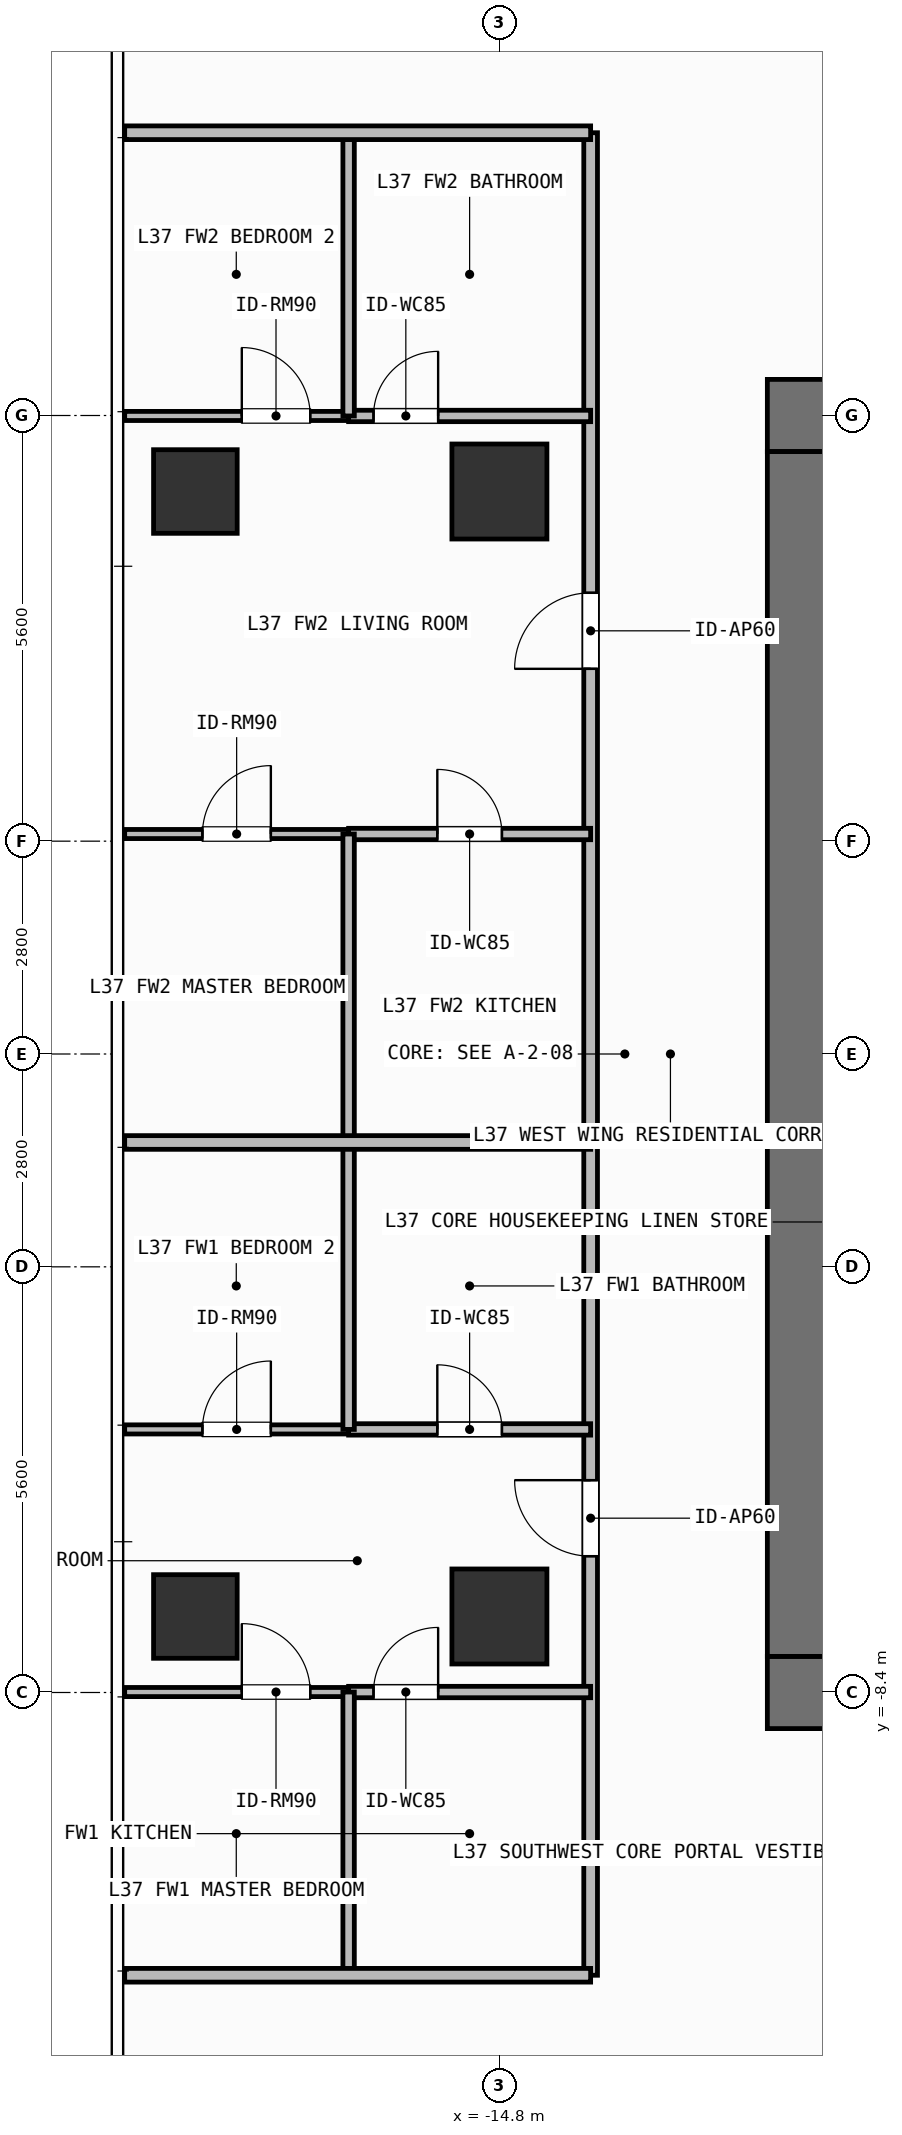
"""IFC4 building model, lengths in metres.
Left out: names, types, materials, properties, quantities, classifications, styles, units other than length and angle.
Written with IfcOpenShell. Run it as: python <this file> out.ifc"""

import sys

from ifc_helpers import new_model, si_unit, direction, frame, frame_2d, origin, origin_2d, place, context, subcontext, project, spatial, rectangle, extrude, element, fill, save


model = new_model("IFC4")
c1 = context("Model", 3, precision=1e-05, world=origin(), true_north=direction((0.0, 1.0)))
c2 = subcontext(c1, "Body", "Model", "MODEL_VIEW")
j1 = project(units=[si_unit("LENGTHUNIT", "METRE"), si_unit("PLANEANGLEUNIT", "RADIAN")], contexts=[c1])
p1 = place(None, origin())
s1 = spatial("IfcSite", under=j1, at=p1, CompositionType="ELEMENT")
p2 = place(p1, origin())
s2 = spatial("IfcBuilding", under=s1, at=p2, CompositionType="ELEMENT")
p3 = place(p2, frame((0.0, 0.0, 148.5)))
s3 = spatial("IfcBuildingStorey", under=s2, at=p3, CompositionType="ELEMENT", Elevation=148.5)
for number, where, z_axis, x_axis in (
    (1, (-11.275, -8.4, 0.0), (0.0, 0.0, 1.0), (1.0, 0.0, 0.0)),
    (2, (-11.275, 8.4, 0.0), (0.0, 0.0, 1.0), (1.0, 0.0, 0.0)),
):
    element("IfcWall", number, at=place(p3, frame(where, z_axis=z_axis, x_axis=x_axis)), inside=s3, PredefinedType="SHEAR", context=c2, shape_type="SweptSolid", body=[
        extrude(rectangle(XDim=1.575, YDim=0.95, at=frame_2d((0.788, 0.0))), origin(), (0.0, 0.0, 1.0), 3.9),
    ])
p4 = place(p3, frame((-10.8, -7.925, 0.0), z_axis=(0.0, 0.0, 1.0), x_axis=(0.0, 1.0, 0.0)))
e3 = element("IfcWall", 3, at=p4, inside=s3, PredefinedType="SHEAR", context=c2, shape_type="SweptSolid", body=[
    extrude(rectangle(XDim=15.85, YDim=0.95, at=frame_2d((7.925, 0.0))), origin(), (0.0, 0.0, 1.0), 3.9),
])
for number, where, z_axis, x_axis in (
    (4, (-14.8, -7.4, 0.0), (0.0, 0.0, 1.0), (1.0, 0.0, 0.0)),
    (5, (-14.8, 7.4, 0.0), (0.0, 0.0, 1.0), (1.0, 0.0, 0.0)),
):
    element("IfcColumn", number, at=place(p3, frame(where, z_axis=z_axis, x_axis=x_axis)), inside=s3, PredefinedType="COLUMN", context=c2, shape_type="SweptSolid", body=[
        extrude(rectangle(XDim=1.25, YDim=1.25, at=origin_2d()), origin(), (0.0, 0.0, 1.0), 3.9),
    ])
for number, where, z_axis, x_axis in (
    (6, (-18.8, -7.4, 0.0), (0.0, 0.0, 1.0), (1.0, 0.0, 0.0)),
    (7, (-18.8, 7.4, 0.0), (0.0, 0.0, 1.0), (1.0, 0.0, 0.0)),
):
    element("IfcColumn", number, at=place(p3, frame(where, z_axis=z_axis, x_axis=x_axis)), inside=s3, PredefinedType="COLUMN", context=c2, shape_type="SweptSolid", body=[
        extrude(rectangle(XDim=1.1, YDim=1.1, at=origin_2d()), origin(), (0.0, 0.0, 1.0), 3.9),
    ])
p5 = place(p3, frame((-13.6, -12.12, 0.0), z_axis=(0.0, 0.0, 1.0), x_axis=(0.0, 1.0, 0.0)))
e8 = element("IfcWall", 8, at=p5, inside=s3, PredefinedType="PARTITIONING", context=c2, shape_type="SweptSolid", body=[
    extrude(rectangle(XDim=10.956, YDim=0.18, at=frame_2d((5.478, 0.0))), origin(), (0.0, 0.0, 1.0), 3.68),
])
p6 = place(p5, frame((5.513, 0.0, 0.0)))
e9 = element("IfcOpeningElement", 9, at=p6, cuts=e8, PredefinedType="OPENING", context=c2, shape_type="SweptSolid", body=[
    extrude(rectangle(XDim=1.0, YDim=2.2, at=frame_2d((0.5, 1.1))), frame((0.0, 0.1, 0.0), z_axis=(0.0, -1.0, 0.0), x_axis=(1.0, 0.0, 0.0)), (0.0, 0.0, 1.0), 0.2),
])
p7 = place(p3, frame((-16.784, -4.939, 0.0), z_axis=(0.0, 0.0, 1.0), x_axis=(1.0, 0.0, 0.0)))
e10 = element("IfcWall", 10, at=p7, inside=s3, PredefinedType="PARTITIONING", context=c2, shape_type="SweptSolid", body=[
    extrude(rectangle(XDim=3.184, YDim=0.15, at=frame_2d((1.592, 0.0))), origin(), (0.0, 0.0, 1.0), 3.68),
])
p8 = place(p7, frame((1.167, 0.0, 0.0)))
e11 = element("IfcOpeningElement", 11, at=p8, cuts=e10, PredefinedType="OPENING", context=c2, shape_type="SweptSolid", body=[
    extrude(rectangle(XDim=0.85, YDim=2.1, at=frame_2d((0.425, 1.05))), frame((0.0, 0.085, 0.0), z_axis=(0.0, -1.0, 0.0), x_axis=(1.0, 0.0, 0.0)), (0.0, 0.0, 1.0), 0.17),
])
p9 = place(p3, frame((-16.784, -8.394, 0.0), z_axis=(0.0, 0.0, 1.0), x_axis=(1.0, 0.0, 0.0)))
e12 = element("IfcWall", 12, at=p9, inside=s3, PredefinedType="PARTITIONING", context=c2, shape_type="SweptSolid", body=[
    extrude(rectangle(XDim=3.184, YDim=0.15, at=frame_2d((1.592, 0.0))), origin(), (0.0, 0.0, 1.0), 3.68),
])
p10 = place(p9, frame((0.328, 0.0, 0.0)))
e13 = element("IfcOpeningElement", 13, at=p10, cuts=e12, PredefinedType="OPENING", context=c2, shape_type="SweptSolid", body=[
    extrude(rectangle(XDim=0.85, YDim=2.1, at=frame_2d((0.425, 1.05))), frame((0.0, 0.085, 0.0), z_axis=(0.0, -1.0, 0.0), x_axis=(1.0, 0.0, 0.0)), (0.0, 0.0, 1.0), 0.17),
])
p11 = place(p3, frame((-19.73, -8.394, 0.0), z_axis=(0.0, 0.0, 1.0), x_axis=(1.0, 0.0, 0.0)))
e14 = element("IfcWall", 14, at=p11, inside=s3, PredefinedType="PARTITIONING", context=c2, shape_type="SweptSolid", body=[
    extrude(rectangle(XDim=2.946, YDim=0.12, at=frame_2d((1.473, 0.0))), origin(), (0.0, 0.0, 1.0), 3.68),
])
p12 = place(p11, frame((1.541, 0.0, 0.0)))
e15 = element("IfcOpeningElement", 15, at=p12, cuts=e14, PredefinedType="OPENING", context=c2, shape_type="SweptSolid", body=[
    extrude(rectangle(XDim=0.9, YDim=2.1, at=frame_2d((0.45, 1.05))), frame((0.0, 0.07, 0.0), z_axis=(0.0, -1.0, 0.0), x_axis=(1.0, 0.0, 0.0)), (0.0, 0.0, 1.0), 0.14),
])
p13 = place(p3, frame((-19.73, -4.939, 0.0), z_axis=(0.0, 0.0, 1.0), x_axis=(1.0, 0.0, 0.0)))
e16 = element("IfcWall", 16, at=p13, inside=s3, PredefinedType="PARTITIONING", context=c2, shape_type="SweptSolid", body=[
    extrude(rectangle(XDim=2.946, YDim=0.12, at=frame_2d((1.473, 0.0))), origin(), (0.0, 0.0, 1.0), 3.68),
])
p14 = place(p13, frame((1.023, 0.0, 0.0)))
e17 = element("IfcOpeningElement", 17, at=p14, cuts=e16, PredefinedType="OPENING", context=c2, shape_type="SweptSolid", body=[
    extrude(rectangle(XDim=0.9, YDim=2.1, at=frame_2d((0.45, 1.05))), frame((0.0, 0.07, 0.0), z_axis=(0.0, -1.0, 0.0), x_axis=(1.0, 0.0, 0.0)), (0.0, 0.0, 1.0), 0.14),
])
p15 = place(p3, frame((-13.6, -1.164, 0.0), z_axis=(0.0, 0.0, 1.0), x_axis=(0.0, 1.0, 0.0)))
e18 = element("IfcWall", 18, at=p15, inside=s3, PredefinedType="PARTITIONING", context=c2, shape_type="SweptSolid", body=[
    extrude(rectangle(XDim=13.284, YDim=0.18, at=frame_2d((6.642, 0.0))), origin(), (0.0, 0.0, 1.0), 3.68),
])
p16 = place(p15, frame((6.231, 0.0, 0.0)))
e19 = element("IfcOpeningElement", 19, at=p16, cuts=e18, PredefinedType="OPENING", context=c2, shape_type="SweptSolid", body=[
    extrude(rectangle(XDim=1.0, YDim=2.2, at=frame_2d((0.5, 1.1))), frame((0.0, 0.1, 0.0), z_axis=(0.0, -1.0, 0.0), x_axis=(1.0, 0.0, 0.0)), (0.0, 0.0, 1.0), 0.2),
])
p17 = place(p3, frame((-16.784, 8.394, 0.0), z_axis=(0.0, 0.0, 1.0), x_axis=(1.0, 0.0, 0.0)))
e20 = element("IfcWall", 20, at=p17, inside=s3, PredefinedType="PARTITIONING", context=c2, shape_type="SweptSolid", body=[
    extrude(rectangle(XDim=3.184, YDim=0.15, at=frame_2d((1.592, 0.0))), origin(), (0.0, 0.0, 1.0), 3.68),
])
p18 = place(p17, frame((0.328, 0.0, 0.0)))
e21 = element("IfcOpeningElement", 21, at=p18, cuts=e20, PredefinedType="OPENING", context=c2, shape_type="SweptSolid", body=[
    extrude(rectangle(XDim=0.85, YDim=2.1, at=frame_2d((0.425, 1.05))), frame((0.0, 0.085, 0.0), z_axis=(0.0, -1.0, 0.0), x_axis=(1.0, 0.0, 0.0)), (0.0, 0.0, 1.0), 0.17),
])
p19 = place(p3, frame((-16.784, 2.894, 0.0), z_axis=(0.0, 0.0, 1.0), x_axis=(1.0, 0.0, 0.0)))
e22 = element("IfcWall", 22, at=p19, inside=s3, PredefinedType="PARTITIONING", context=c2, shape_type="SweptSolid", body=[
    extrude(rectangle(XDim=3.184, YDim=0.15, at=frame_2d((1.592, 0.0))), origin(), (0.0, 0.0, 1.0), 3.68),
])
p20 = place(p19, frame((1.167, 0.0, 0.0)))
e23 = element("IfcOpeningElement", 23, at=p20, cuts=e22, PredefinedType="OPENING", context=c2, shape_type="SweptSolid", body=[
    extrude(rectangle(XDim=0.85, YDim=2.1, at=frame_2d((0.425, 1.05))), frame((0.0, 0.085, 0.0), z_axis=(0.0, -1.0, 0.0), x_axis=(1.0, 0.0, 0.0)), (0.0, 0.0, 1.0), 0.17),
])
p21 = place(p3, frame((-19.73, 2.894, 0.0), z_axis=(0.0, 0.0, 1.0), x_axis=(1.0, 0.0, 0.0)))
e24 = element("IfcWall", 24, at=p21, inside=s3, PredefinedType="PARTITIONING", context=c2, shape_type="SweptSolid", body=[
    extrude(rectangle(XDim=2.946, YDim=0.12, at=frame_2d((1.473, 0.0))), origin(), (0.0, 0.0, 1.0), 3.68),
])
p22 = place(p21, frame((1.023, 0.0, 0.0)))
e25 = element("IfcOpeningElement", 25, at=p22, cuts=e24, PredefinedType="OPENING", context=c2, shape_type="SweptSolid", body=[
    extrude(rectangle(XDim=0.9, YDim=2.1, at=frame_2d((0.45, 1.05))), frame((0.0, 0.07, 0.0), z_axis=(0.0, -1.0, 0.0), x_axis=(1.0, 0.0, 0.0)), (0.0, 0.0, 1.0), 0.14),
])
p23 = place(p3, frame((-19.73, 8.394, 0.0), z_axis=(0.0, 0.0, 1.0), x_axis=(1.0, 0.0, 0.0)))
e26 = element("IfcWall", 26, at=p23, inside=s3, PredefinedType="PARTITIONING", context=c2, shape_type="SweptSolid", body=[
    extrude(rectangle(XDim=2.946, YDim=0.12, at=frame_2d((1.473, 0.0))), origin(), (0.0, 0.0, 1.0), 3.68),
])
p24 = place(p23, frame((1.541, 0.0, 0.0)))
e27 = element("IfcOpeningElement", 27, at=p24, cuts=e26, PredefinedType="OPENING", context=c2, shape_type="SweptSolid", body=[
    extrude(rectangle(XDim=0.9, YDim=2.1, at=frame_2d((0.45, 1.05))), frame((0.0, 0.07, 0.0), z_axis=(0.0, -1.0, 0.0), x_axis=(1.0, 0.0, 0.0)), (0.0, 0.0, 1.0), 0.14),
])
p25 = place(p3, frame((-16.784, -12.12, 0.0), z_axis=(0.0, 0.0, 1.0), x_axis=(0.0, 1.0, 0.0)))
e28 = element("IfcWall", 28, at=p25, inside=s3, PredefinedType="PARTITIONING", context=c2, shape_type="SweptSolid", body=[
    extrude(rectangle(XDim=3.726, YDim=0.15, at=frame_2d((1.863, 0.0))), origin(), (0.0, 0.0, 1.0), 3.68),
])
p26 = place(p3, frame((-16.784, -4.939, 0.0), z_axis=(0.0, 0.0, 1.0), x_axis=(0.0, 1.0, 0.0)))
e29 = element("IfcWall", 29, at=p26, inside=s3, PredefinedType="PARTITIONING", context=c2, shape_type="SweptSolid", body=[
    extrude(rectangle(XDim=3.775, YDim=0.15, at=frame_2d((1.887, 0.0))), origin(), (0.0, 0.0, 1.0), 3.68),
])
p27 = place(p3, frame((-16.784, -1.164, 0.0), z_axis=(0.0, 0.0, 1.0), x_axis=(0.0, 1.0, 0.0)))
e30 = element("IfcWall", 30, at=p27, inside=s3, PredefinedType="PARTITIONING", context=c2, shape_type="SweptSolid", body=[
    extrude(rectangle(XDim=4.058, YDim=0.15, at=frame_2d((2.029, 0.0))), origin(), (0.0, 0.0, 1.0), 3.68),
])
p28 = place(p3, frame((-16.784, 8.394, 0.0), z_axis=(0.0, 0.0, 1.0), x_axis=(0.0, 1.0, 0.0)))
e31 = element("IfcWall", 31, at=p28, inside=s3, PredefinedType="PARTITIONING", context=c2, shape_type="SweptSolid", body=[
    extrude(rectangle(XDim=3.726, YDim=0.15, at=frame_2d((1.863, 0.0))), origin(), (0.0, 0.0, 1.0), 3.68),
])
for number, where, z_axis, x_axis in (
    (32, (-19.73, -1.164, 0.0), (0.0, 0.0, 1.0), (1.0, 0.0, 0.0)),
    (33, (-19.73, -12.12, 0.0), (0.0, 0.0, 1.0), (1.0, 0.0, 0.0)),
    (34, (-19.73, 12.12, 0.0), (0.0, 0.0, 1.0), (1.0, 0.0, 0.0)),
):
    element("IfcWall", number, at=place(p3, frame(where, z_axis=z_axis, x_axis=x_axis)), inside=s3, PredefinedType="PARTITIONING", context=c2, shape_type="SweptSolid", body=[
        extrude(rectangle(XDim=6.13, YDim=0.18, at=frame_2d((3.065, 0.0))), origin(), (0.0, 0.0, 1.0), 3.68),
    ])
p29 = place(p6, origin())
e35 = element("IfcDoor", 35, at=p29, inside=s3, OperationType="SINGLE_SWING_RIGHT", PredefinedType="DOOR", context=c2, shape_type="SweptSolid", body=[
    extrude(rectangle(XDim=1.0, YDim=2.2, at=frame_2d((0.5, 1.1))), frame((0.0, 0.025, 0.0), z_axis=(0.0, -1.0, 0.0), x_axis=(1.0, 0.0, 0.0)), (0.0, 0.0, 1.0), 0.05),
])
fill(e9, e35)
p30 = place(p8, origin())
e36 = element("IfcDoor", 36, at=p30, inside=s3, OperationType="SINGLE_SWING_LEFT", PredefinedType="DOOR", context=c2, shape_type="SweptSolid", body=[
    extrude(rectangle(XDim=0.85, YDim=2.1, at=frame_2d((0.425, 1.05))), frame((0.0, 0.025, 0.0), z_axis=(0.0, -1.0, 0.0), x_axis=(1.0, 0.0, 0.0)), (0.0, 0.0, 1.0), 0.05),
])
fill(e11, e36)
p31 = place(p10, origin())
e37 = element("IfcDoor", 37, at=p31, inside=s3, OperationType="SINGLE_SWING_RIGHT", PredefinedType="DOOR", context=c2, shape_type="SweptSolid", body=[
    extrude(rectangle(XDim=0.85, YDim=2.1, at=frame_2d((0.425, 1.05))), frame((0.0, 0.025, 0.0), z_axis=(0.0, -1.0, 0.0), x_axis=(1.0, 0.0, 0.0)), (0.0, 0.0, 1.0), 0.05),
])
fill(e13, e37)
p32 = place(p12, origin())
e38 = element("IfcDoor", 38, at=p32, inside=s3, OperationType="SINGLE_SWING_LEFT", PredefinedType="DOOR", context=c2, shape_type="SweptSolid", body=[
    extrude(rectangle(XDim=0.9, YDim=2.1, at=frame_2d((0.45, 1.05))), frame((0.0, 0.025, 0.0), z_axis=(0.0, -1.0, 0.0), x_axis=(1.0, 0.0, 0.0)), (0.0, 0.0, 1.0), 0.05),
])
fill(e15, e38)
p33 = place(p14, origin())
e39 = element("IfcDoor", 39, at=p33, inside=s3, OperationType="SINGLE_SWING_RIGHT", PredefinedType="DOOR", context=c2, shape_type="SweptSolid", body=[
    extrude(rectangle(XDim=0.9, YDim=2.1, at=frame_2d((0.45, 1.05))), frame((0.0, 0.025, 0.0), z_axis=(0.0, -1.0, 0.0), x_axis=(1.0, 0.0, 0.0)), (0.0, 0.0, 1.0), 0.05),
])
fill(e17, e39)
p34 = place(p16, origin())
e40 = element("IfcDoor", 40, at=p34, inside=s3, OperationType="SINGLE_SWING_LEFT", PredefinedType="DOOR", context=c2, shape_type="SweptSolid", body=[
    extrude(rectangle(XDim=1.0, YDim=2.2, at=frame_2d((0.5, 1.1))), frame((0.0, 0.025, 0.0), z_axis=(0.0, -1.0, 0.0), x_axis=(1.0, 0.0, 0.0)), (0.0, 0.0, 1.0), 0.05),
])
fill(e19, e40)
p35 = place(p18, origin())
e41 = element("IfcDoor", 41, at=p35, inside=s3, OperationType="SINGLE_SWING_RIGHT", PredefinedType="DOOR", context=c2, shape_type="SweptSolid", body=[
    extrude(rectangle(XDim=0.85, YDim=2.1, at=frame_2d((0.425, 1.05))), frame((0.0, 0.025, 0.0), z_axis=(0.0, -1.0, 0.0), x_axis=(1.0, 0.0, 0.0)), (0.0, 0.0, 1.0), 0.05),
])
fill(e21, e41)
p36 = place(p20, origin())
e42 = element("IfcDoor", 42, at=p36, inside=s3, OperationType="SINGLE_SWING_LEFT", PredefinedType="DOOR", context=c2, shape_type="SweptSolid", body=[
    extrude(rectangle(XDim=0.85, YDim=2.1, at=frame_2d((0.425, 1.05))), frame((0.0, 0.025, 0.0), z_axis=(0.0, -1.0, 0.0), x_axis=(1.0, 0.0, 0.0)), (0.0, 0.0, 1.0), 0.05),
])
fill(e23, e42)
p37 = place(p22, origin())
e43 = element("IfcDoor", 43, at=p37, inside=s3, OperationType="SINGLE_SWING_RIGHT", PredefinedType="DOOR", context=c2, shape_type="SweptSolid", body=[
    extrude(rectangle(XDim=0.9, YDim=2.1, at=frame_2d((0.45, 1.05))), frame((0.0, 0.025, 0.0), z_axis=(0.0, -1.0, 0.0), x_axis=(1.0, 0.0, 0.0)), (0.0, 0.0, 1.0), 0.05),
])
fill(e25, e43)
p38 = place(p24, origin())
e44 = element("IfcDoor", 44, at=p38, inside=s3, OperationType="SINGLE_SWING_LEFT", PredefinedType="DOOR", context=c2, shape_type="SweptSolid", body=[
    extrude(rectangle(XDim=0.9, YDim=2.1, at=frame_2d((0.45, 1.05))), frame((0.0, 0.025, 0.0), z_axis=(0.0, -1.0, 0.0), x_axis=(1.0, 0.0, 0.0)), (0.0, 0.0, 1.0), 0.05),
])
fill(e27, e44)
save(model, sys.argv[1])
